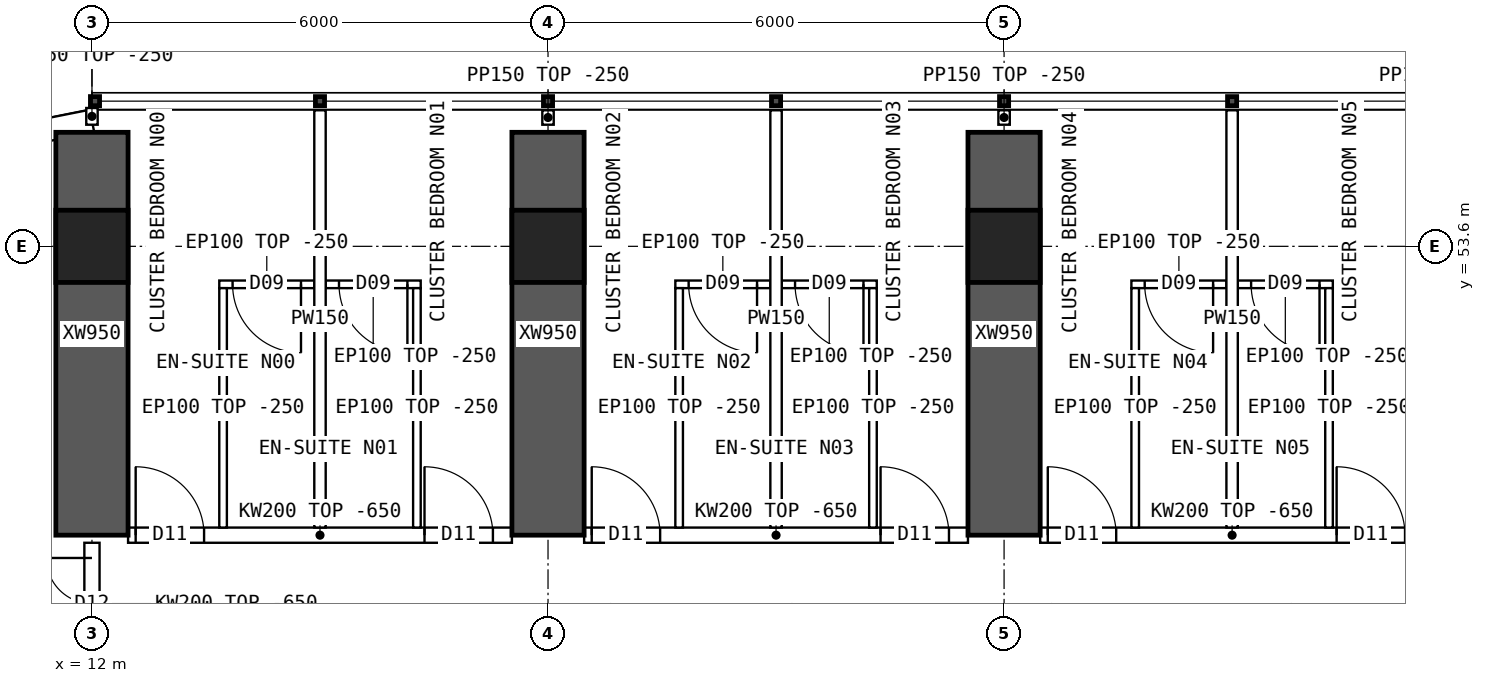
"""IFC4 building model, lengths in metres.
Left out: names, types, materials, properties, quantities, classifications, styles, units other than length and angle.
Written with IfcOpenShell. Run it as: python <this file> out.ifc"""

import sys

from ifc_helpers import new_model, si_unit, direction, frame, frame_2d, origin, origin_2d, place, context, subcontext, project, spatial, polyline, rectangle, hollow_rectangle, outline, extrude, element, fill, save


model = new_model("IFC4")
c1 = context("Model", 3, precision=1e-05, world=origin(), true_north=direction((0.0, 1.0)))
c2 = subcontext(c1, "Body", "Model", "MODEL_VIEW")
j1 = project(units=[si_unit("LENGTHUNIT", "METRE"), si_unit("PLANEANGLEUNIT", "RADIAN")], contexts=[c1])
p1 = place(None, origin())
s1 = spatial("IfcSite", under=j1, at=p1, CompositionType="ELEMENT")
p2 = place(p1, origin())
s2 = spatial("IfcBuilding", under=s1, at=p2, CompositionType="ELEMENT")
p3 = place(p2, frame((0.0, 0.0, 114.4)))
s3 = spatial("IfcBuildingStorey", under=s2, at=p3, CompositionType="ELEMENT", Elevation=114.4)
for number, where, z_axis, x_axis in (
    (1, (12.0, 53.6, 0.0), (0.0, 0.0, 1.0), (1.0, 0.0, 0.0)),
    (2, (18.0, 53.6, 0.0), (0.0, 0.0, 1.0), (1.0, 0.0, 0.0)),
    (3, (24.0, 53.6, 0.0), (0.0, 0.0, 1.0), (1.0, 0.0, 0.0)),
):
    element("IfcColumn", number, at=place(p3, frame(where, z_axis=z_axis, x_axis=x_axis)), inside=s3, PredefinedType="COLUMN", context=c2, shape_type="SweptSolid", body=[
        extrude(hollow_rectangle(XDim=0.95, YDim=0.95, WallThickness=0.095, at=origin_2d()), origin(), (0.0, 0.0, 1.0), 3.75),
    ])
for number, where, z_axis, x_axis in (
    (4, (12.0, 49.8, 0.0), (0.0, 0.0, 1.0), (0.0, 1.0, 0.0)),
    (5, (18.0, 49.8, 0.0), (0.0, 0.0, 1.0), (0.0, 1.0, 0.0)),
    (6, (24.0, 49.8, 0.0), (0.0, 0.0, 1.0), (0.0, 1.0, 0.0)),
):
    element("IfcWall", number, at=place(p3, frame(where, z_axis=z_axis, x_axis=x_axis)), inside=s3, PredefinedType="SHEAR", context=c2, shape_type="SweptSolid", body=[
        extrude(rectangle(XDim=5.3, YDim=0.95, at=frame_2d((2.65, 0.0))), origin(), (0.0, 0.0, 1.0), 3.75),
    ])
p4 = place(p3, frame((12.0, 55.25, 0.0), z_axis=(0.0, 0.0, 1.0), x_axis=(-0.980787251524, -0.195080412259, 0.0)))
e7 = element("IfcWall", 7, at=p4, inside=s3, PredefinedType="SOLIDWALL", context=c2, shape_type="SweptSolid", body=[
    extrude(outline(polyline([(-0.03, -0.15), (3.249, -0.15), (3.189, 0.15), (0.03, 0.15), (-0.03, -0.15)])), origin(), (0.0, 0.0, 1.0), 3.5),
])
p5 = place(p4, frame((0.909, 0.0, 0.9)))
e8 = element("IfcOpeningElement", 8, at=p5, cuts=e7, PredefinedType="OPENING", context=c2, shape_type="SweptSolid", body=[
    extrude(rectangle(XDim=1.4, YDim=1.8, at=frame_2d((0.7, 0.9))), frame((0.0, 0.16, 0.0), z_axis=(0.0, -1.0, 0.0), x_axis=(1.0, 0.0, 0.0)), (0.0, 0.0, 1.0), 0.32),
])
p6 = place(p3, frame((12.475, 49.8, 0.0), z_axis=(0.0, 0.0, 1.0), x_axis=(1.0, 0.0, 0.0)))
e9 = element("IfcWall", 9, at=p6, inside=s3, PredefinedType="SOLIDWALL", context=c2, shape_type="SweptSolid", body=[
    extrude(outline(polyline([(0.0, 0.0), (5.05, 0.0), (5.05, 3.1), (0.0, 3.1), (0.0, 0.0)])), frame((0.0, 0.1, 0.0), z_axis=(0.0, -1.0, 0.0), x_axis=(1.0, 0.0, 0.0)), (0.0, 0.0, 1.0), 0.2),
])
p7 = place(p6, frame((0.1, 0.0, 0.0)))
e10 = element("IfcOpeningElement", 10, at=p7, cuts=e9, PredefinedType="OPENING", context=c2, shape_type="SweptSolid", body=[
    extrude(rectangle(XDim=0.9, YDim=2.1, at=frame_2d((0.45, 1.05))), frame((0.0, 0.11, 0.0), z_axis=(0.0, -1.0, 0.0), x_axis=(1.0, 0.0, 0.0)), (0.0, 0.0, 1.0), 0.22),
])
p8 = place(p6, frame((3.9, 0.0, 0.0)))
e11 = element("IfcOpeningElement", 11, at=p8, cuts=e9, PredefinedType="OPENING", context=c2, shape_type="SweptSolid", body=[
    extrude(rectangle(XDim=0.9, YDim=2.1, at=frame_2d((0.45, 1.05))), frame((0.0, 0.11, 0.0), z_axis=(0.0, -1.0, 0.0), x_axis=(1.0, 0.0, 0.0)), (0.0, 0.0, 1.0), 0.22),
])
p9 = place(p3, frame((18.475, 49.8, 0.0), z_axis=(0.0, 0.0, 1.0), x_axis=(1.0, 0.0, 0.0)))
e12 = element("IfcWall", 12, at=p9, inside=s3, PredefinedType="SOLIDWALL", context=c2, shape_type="SweptSolid", body=[
    extrude(outline(polyline([(0.0, 0.0), (5.05, 0.0), (5.05, 3.1), (0.0, 3.1), (0.0, 0.0)])), frame((0.0, 0.1, 0.0), z_axis=(0.0, -1.0, 0.0), x_axis=(1.0, 0.0, 0.0)), (0.0, 0.0, 1.0), 0.2),
])
p10 = place(p9, frame((0.1, 0.0, 0.0)))
e13 = element("IfcOpeningElement", 13, at=p10, cuts=e12, PredefinedType="OPENING", context=c2, shape_type="SweptSolid", body=[
    extrude(rectangle(XDim=0.9, YDim=2.1, at=frame_2d((0.45, 1.05))), frame((0.0, 0.11, 0.0), z_axis=(0.0, -1.0, 0.0), x_axis=(1.0, 0.0, 0.0)), (0.0, 0.0, 1.0), 0.22),
])
p11 = place(p9, frame((3.9, 0.0, 0.0)))
e14 = element("IfcOpeningElement", 14, at=p11, cuts=e12, PredefinedType="OPENING", context=c2, shape_type="SweptSolid", body=[
    extrude(rectangle(XDim=0.9, YDim=2.1, at=frame_2d((0.45, 1.05))), frame((0.0, 0.11, 0.0), z_axis=(0.0, -1.0, 0.0), x_axis=(1.0, 0.0, 0.0)), (0.0, 0.0, 1.0), 0.22),
])
p12 = place(p3, frame((24.475, 49.8, 0.0), z_axis=(0.0, 0.0, 1.0), x_axis=(1.0, 0.0, 0.0)))
e15 = element("IfcWall", 15, at=p12, inside=s3, PredefinedType="SOLIDWALL", context=c2, shape_type="SweptSolid", body=[
    extrude(outline(polyline([(0.0, 0.0), (5.05, 0.0), (5.05, 3.1), (0.0, 3.1), (0.0, 0.0)])), frame((0.0, 0.1, 0.0), z_axis=(0.0, -1.0, 0.0), x_axis=(1.0, 0.0, 0.0)), (0.0, 0.0, 1.0), 0.2),
])
p13 = place(p12, frame((0.1, 0.0, 0.0)))
e16 = element("IfcOpeningElement", 16, at=p13, cuts=e15, PredefinedType="OPENING", context=c2, shape_type="SweptSolid", body=[
    extrude(rectangle(XDim=0.9, YDim=2.1, at=frame_2d((0.45, 1.05))), frame((0.0, 0.11, 0.0), z_axis=(0.0, -1.0, 0.0), x_axis=(1.0, 0.0, 0.0)), (0.0, 0.0, 1.0), 0.22),
])
p14 = place(p12, frame((3.9, 0.0, 0.0)))
e17 = element("IfcOpeningElement", 17, at=p14, cuts=e15, PredefinedType="OPENING", context=c2, shape_type="SweptSolid", body=[
    extrude(rectangle(XDim=0.9, YDim=2.1, at=frame_2d((0.45, 1.05))), frame((0.0, 0.11, 0.0), z_axis=(0.0, -1.0, 0.0), x_axis=(1.0, 0.0, 0.0)), (0.0, 0.0, 1.0), 0.22),
])
p15 = place(p3, frame((15.0, 55.39, 0.0), z_axis=(0.0, 0.0, 1.0), x_axis=(0.0, -1.0, 0.0)))
e18 = element("IfcWall", 18, at=p15, inside=s3, PredefinedType="PARTITIONING", context=c2, shape_type="SweptSolid", body=[
    extrude(outline(polyline([(0.0, 0.0), (5.49, 0.0), (5.49, 3.1), (5.442, 3.1), (5.44, 3.5), (1.992, 3.5), (1.99, 3.1), (1.592, 3.1), (1.59, 3.5), (0.0, 3.5), (0.0, 0.0)])), frame((0.0, 0.075, 0.0), z_axis=(0.0, -1.0, 0.0), x_axis=(1.0, 0.0, 0.0)), (0.0, 0.0, 1.0), 0.15),
])
p16 = place(p3, frame((13.675, 53.1, 0.0), z_axis=(0.0, 0.0, 1.0), x_axis=(1.0, 0.0, 0.0)))
e19 = element("IfcWall", 19, at=p16, inside=s3, PredefinedType="PARTITIONING", context=c2, shape_type="SweptSolid", body=[
    extrude(rectangle(XDim=1.25, YDim=0.1, at=frame_2d((0.625, 0.0))), origin(), (0.0, 0.0, 1.0), 3.5),
])
p17 = place(p16, frame((0.175, 0.0, 0.0)))
e20 = element("IfcOpeningElement", 20, at=p17, cuts=e19, PredefinedType="OPENING", context=c2, shape_type="SweptSolid", body=[
    extrude(rectangle(XDim=0.9, YDim=2.1, at=frame_2d((0.45, 1.05))), frame((0.0, 0.06, 0.0), z_axis=(0.0, -1.0, 0.0), x_axis=(1.0, 0.0, 0.0)), (0.0, 0.0, 1.0), 0.12),
])
p18 = place(p3, frame((13.725, 53.05, 0.0), z_axis=(0.0, 0.0, 1.0), x_axis=(0.0, -1.0, 0.0)))
e21 = element("IfcWall", 21, at=p18, inside=s3, PredefinedType="PARTITIONING", context=c2, shape_type="SweptSolid", body=[
    extrude(outline(polyline([(0.0, 0.0), (3.15, 0.0), (3.15, 3.1), (3.102, 3.1), (3.1, 3.5), (0.0, 3.5), (0.0, 0.0)])), frame((0.0, 0.05, 0.0), z_axis=(0.0, -1.0, 0.0), x_axis=(1.0, 0.0, 0.0)), (0.0, 0.0, 1.0), 0.1),
])
p19 = place(p3, frame((15.075, 53.1, 0.0), z_axis=(0.0, 0.0, 1.0), x_axis=(1.0, 0.0, 0.0)))
e22 = element("IfcWall", 22, at=p19, inside=s3, PredefinedType="PARTITIONING", context=c2, shape_type="SweptSolid", body=[
    extrude(rectangle(XDim=1.25, YDim=0.1, at=frame_2d((0.625, 0.0))), origin(), (0.0, 0.0, 1.0), 3.5),
])
p20 = place(p19, frame((0.175, 0.0, 0.0)))
e23 = element("IfcOpeningElement", 23, at=p20, cuts=e22, PredefinedType="OPENING", context=c2, shape_type="SweptSolid", body=[
    extrude(rectangle(XDim=0.9, YDim=2.1, at=frame_2d((0.45, 1.05))), frame((0.0, 0.06, 0.0), z_axis=(0.0, -1.0, 0.0), x_axis=(1.0, 0.0, 0.0)), (0.0, 0.0, 1.0), 0.12),
])
p21 = place(p3, frame((16.275, 53.05, 0.0), z_axis=(0.0, 0.0, 1.0), x_axis=(0.0, -1.0, 0.0)))
e24 = element("IfcWall", 24, at=p21, inside=s3, PredefinedType="PARTITIONING", context=c2, shape_type="SweptSolid", body=[
    extrude(outline(polyline([(0.0, 0.0), (3.15, 0.0), (3.15, 3.1), (3.102, 3.1), (3.1, 3.5), (0.0, 3.5), (0.0, 0.0)])), frame((0.0, 0.05, 0.0), z_axis=(0.0, -1.0, 0.0), x_axis=(1.0, 0.0, 0.0)), (0.0, 0.0, 1.0), 0.1),
])
p22 = place(p3, frame((21.0, 55.39, 0.0), z_axis=(0.0, 0.0, 1.0), x_axis=(0.0, -1.0, 0.0)))
e25 = element("IfcWall", 25, at=p22, inside=s3, PredefinedType="PARTITIONING", context=c2, shape_type="SweptSolid", body=[
    extrude(outline(polyline([(0.0, 0.0), (5.49, 0.0), (5.49, 3.1), (5.442, 3.1), (5.44, 3.5), (1.992, 3.5), (1.99, 3.1), (1.592, 3.1), (1.59, 3.5), (0.0, 3.5), (0.0, 0.0)])), frame((0.0, 0.075, 0.0), z_axis=(0.0, -1.0, 0.0), x_axis=(1.0, 0.0, 0.0)), (0.0, 0.0, 1.0), 0.15),
])
p23 = place(p3, frame((19.675, 53.1, 0.0), z_axis=(0.0, 0.0, 1.0), x_axis=(1.0, 0.0, 0.0)))
e26 = element("IfcWall", 26, at=p23, inside=s3, PredefinedType="PARTITIONING", context=c2, shape_type="SweptSolid", body=[
    extrude(rectangle(XDim=1.25, YDim=0.1, at=frame_2d((0.625, 0.0))), origin(), (0.0, 0.0, 1.0), 3.5),
])
p24 = place(p23, frame((0.175, 0.0, 0.0)))
e27 = element("IfcOpeningElement", 27, at=p24, cuts=e26, PredefinedType="OPENING", context=c2, shape_type="SweptSolid", body=[
    extrude(rectangle(XDim=0.9, YDim=2.1, at=frame_2d((0.45, 1.05))), frame((0.0, 0.06, 0.0), z_axis=(0.0, -1.0, 0.0), x_axis=(1.0, 0.0, 0.0)), (0.0, 0.0, 1.0), 0.12),
])
p25 = place(p3, frame((19.725, 53.05, 0.0), z_axis=(0.0, 0.0, 1.0), x_axis=(0.0, -1.0, 0.0)))
e28 = element("IfcWall", 28, at=p25, inside=s3, PredefinedType="PARTITIONING", context=c2, shape_type="SweptSolid", body=[
    extrude(outline(polyline([(0.0, 0.0), (3.15, 0.0), (3.15, 3.1), (3.102, 3.1), (3.1, 3.5), (0.0, 3.5), (0.0, 0.0)])), frame((0.0, 0.05, 0.0), z_axis=(0.0, -1.0, 0.0), x_axis=(1.0, 0.0, 0.0)), (0.0, 0.0, 1.0), 0.1),
])
p26 = place(p3, frame((21.075, 53.1, 0.0), z_axis=(0.0, 0.0, 1.0), x_axis=(1.0, 0.0, 0.0)))
e29 = element("IfcWall", 29, at=p26, inside=s3, PredefinedType="PARTITIONING", context=c2, shape_type="SweptSolid", body=[
    extrude(rectangle(XDim=1.25, YDim=0.1, at=frame_2d((0.625, 0.0))), origin(), (0.0, 0.0, 1.0), 3.5),
])
p27 = place(p26, frame((0.175, 0.0, 0.0)))
e30 = element("IfcOpeningElement", 30, at=p27, cuts=e29, PredefinedType="OPENING", context=c2, shape_type="SweptSolid", body=[
    extrude(rectangle(XDim=0.9, YDim=2.1, at=frame_2d((0.45, 1.05))), frame((0.0, 0.06, 0.0), z_axis=(0.0, -1.0, 0.0), x_axis=(1.0, 0.0, 0.0)), (0.0, 0.0, 1.0), 0.12),
])
p28 = place(p3, frame((22.275, 53.05, 0.0), z_axis=(0.0, 0.0, 1.0), x_axis=(0.0, -1.0, 0.0)))
e31 = element("IfcWall", 31, at=p28, inside=s3, PredefinedType="PARTITIONING", context=c2, shape_type="SweptSolid", body=[
    extrude(outline(polyline([(0.0, 0.0), (3.15, 0.0), (3.15, 3.1), (3.102, 3.1), (3.1, 3.5), (0.0, 3.5), (0.0, 0.0)])), frame((0.0, 0.05, 0.0), z_axis=(0.0, -1.0, 0.0), x_axis=(1.0, 0.0, 0.0)), (0.0, 0.0, 1.0), 0.1),
])
p29 = place(p3, frame((27.0, 55.39, 0.0), z_axis=(0.0, 0.0, 1.0), x_axis=(0.0, -1.0, 0.0)))
e32 = element("IfcWall", 32, at=p29, inside=s3, PredefinedType="PARTITIONING", context=c2, shape_type="SweptSolid", body=[
    extrude(outline(polyline([(0.0, 0.0), (5.49, 0.0), (5.49, 3.1), (5.442, 3.1), (5.44, 3.5), (1.992, 3.5), (1.99, 3.1), (1.592, 3.1), (1.59, 3.5), (0.0, 3.5), (0.0, 0.0)])), frame((0.0, 0.075, 0.0), z_axis=(0.0, -1.0, 0.0), x_axis=(1.0, 0.0, 0.0)), (0.0, 0.0, 1.0), 0.15),
])
p30 = place(p3, frame((25.675, 53.1, 0.0), z_axis=(0.0, 0.0, 1.0), x_axis=(1.0, 0.0, 0.0)))
e33 = element("IfcWall", 33, at=p30, inside=s3, PredefinedType="PARTITIONING", context=c2, shape_type="SweptSolid", body=[
    extrude(rectangle(XDim=1.25, YDim=0.1, at=frame_2d((0.625, 0.0))), origin(), (0.0, 0.0, 1.0), 3.5),
])
p31 = place(p30, frame((0.175, 0.0, 0.0)))
e34 = element("IfcOpeningElement", 34, at=p31, cuts=e33, PredefinedType="OPENING", context=c2, shape_type="SweptSolid", body=[
    extrude(rectangle(XDim=0.9, YDim=2.1, at=frame_2d((0.45, 1.05))), frame((0.0, 0.06, 0.0), z_axis=(0.0, -1.0, 0.0), x_axis=(1.0, 0.0, 0.0)), (0.0, 0.0, 1.0), 0.12),
])
p32 = place(p3, frame((25.725, 53.05, 0.0), z_axis=(0.0, 0.0, 1.0), x_axis=(0.0, -1.0, 0.0)))
e35 = element("IfcWall", 35, at=p32, inside=s3, PredefinedType="PARTITIONING", context=c2, shape_type="SweptSolid", body=[
    extrude(outline(polyline([(0.0, 0.0), (3.15, 0.0), (3.15, 3.1), (3.102, 3.1), (3.1, 3.5), (0.0, 3.5), (0.0, 0.0)])), frame((0.0, 0.05, 0.0), z_axis=(0.0, -1.0, 0.0), x_axis=(1.0, 0.0, 0.0)), (0.0, 0.0, 1.0), 0.1),
])
p33 = place(p3, frame((27.075, 53.1, 0.0), z_axis=(0.0, 0.0, 1.0), x_axis=(1.0, 0.0, 0.0)))
e36 = element("IfcWall", 36, at=p33, inside=s3, PredefinedType="PARTITIONING", context=c2, shape_type="SweptSolid", body=[
    extrude(rectangle(XDim=1.25, YDim=0.1, at=frame_2d((0.625, 0.0))), origin(), (0.0, 0.0, 1.0), 3.5),
])
p34 = place(p33, frame((0.175, 0.0, 0.0)))
e37 = element("IfcOpeningElement", 37, at=p34, cuts=e36, PredefinedType="OPENING", context=c2, shape_type="SweptSolid", body=[
    extrude(rectangle(XDim=0.9, YDim=2.1, at=frame_2d((0.45, 1.05))), frame((0.0, 0.06, 0.0), z_axis=(0.0, -1.0, 0.0), x_axis=(1.0, 0.0, 0.0)), (0.0, 0.0, 1.0), 0.12),
])
p35 = place(p3, frame((28.275, 53.05, 0.0), z_axis=(0.0, 0.0, 1.0), x_axis=(0.0, -1.0, 0.0)))
e38 = element("IfcWall", 38, at=p35, inside=s3, PredefinedType="PARTITIONING", context=c2, shape_type="SweptSolid", body=[
    extrude(outline(polyline([(0.0, 0.0), (3.15, 0.0), (3.15, 3.1), (3.102, 3.1), (3.1, 3.5), (0.0, 3.5), (0.0, 0.0)])), frame((0.0, 0.05, 0.0), z_axis=(0.0, -1.0, 0.0), x_axis=(1.0, 0.0, 0.0)), (0.0, 0.0, 1.0), 0.1),
])
p36 = place(p3, frame((12.0, 48.1, 0.0), z_axis=(0.0, 0.0, 1.0), x_axis=(0.0, 1.0, 0.0)))
e39 = element("IfcWall", 39, at=p36, inside=s3, PredefinedType="SOLIDWALL", context=c2, shape_type="SweptSolid", body=[
    extrude(outline(polyline([(0.0, 0.0), (1.6, 0.0), (1.6, 3.1), (0.0, 3.1), (0.0, 0.0)])), frame((0.0, 0.1, 0.0), z_axis=(0.0, -1.0, 0.0), x_axis=(1.0, 0.0, 0.0)), (0.0, 0.0, 1.0), 0.2),
])
p37 = place(p36, frame((0.2, 0.0, 0.0)))
e40 = element("IfcOpeningElement", 40, at=p37, cuts=e39, PredefinedType="OPENING", context=c2, shape_type="SweptSolid", body=[
    extrude(rectangle(XDim=1.2, YDim=2.1, at=frame_2d((0.6, 1.05))), frame((0.0, 0.11, 0.0), z_axis=(0.0, -1.0, 0.0), x_axis=(1.0, 0.0, 0.0)), (0.0, 0.0, 1.0), 0.22),
])
p38 = place(p3, frame((12.0, 55.2, 0.0), z_axis=(0.0, 0.0, 1.0), x_axis=(0.0, 1.0, 0.0)))
e41 = element("IfcWall", 41, at=p38, inside=s3, PredefinedType="PARTITIONING", context=c2, shape_type="SweptSolid", body=[
    extrude(rectangle(XDim=0.22, YDim=0.15, at=frame_2d((0.11, 0.0))), origin(), (0.0, 0.0, 1.0), 3.5),
])
for number, where, z_axis, x_axis in (
    (42, (18.0, 55.2, 0.0), (0.0, 0.0, 1.0), (0.0, 1.0, 0.0)),
    (43, (24.0, 55.2, 0.0), (0.0, 0.0, 1.0), (0.0, 1.0, 0.0)),
):
    element("IfcWall", number, at=place(p3, frame(where, z_axis=z_axis, x_axis=x_axis)), inside=s3, PredefinedType="PARTITIONING", context=c2, shape_type="SweptSolid", body=[
        extrude(rectangle(XDim=0.19, YDim=0.15, at=frame_2d((0.095, 0.0))), origin(), (0.0, 0.0, 1.0), 3.5),
    ])
p39 = place(p17, origin())
e44 = element("IfcDoor", 44, at=p39, inside=s3, OperationType="SINGLE_SWING_RIGHT", PredefinedType="DOOR", context=c2, shape_type="SweptSolid", body=[
    extrude(rectangle(XDim=0.9, YDim=2.1, at=frame_2d((0.45, 1.05))), frame((0.0, 0.025, 0.0), z_axis=(0.0, -1.0, 0.0), x_axis=(1.0, 0.0, 0.0)), (0.0, 0.0, 1.0), 0.05),
])
fill(e20, e44)
p40 = place(p7, origin())
e45 = element("IfcDoor", 45, at=p40, inside=s3, OperationType="SINGLE_SWING_LEFT", PredefinedType="DOOR", context=c2, shape_type="SweptSolid", body=[
    extrude(rectangle(XDim=0.9, YDim=2.1, at=frame_2d((0.45, 1.05))), frame((0.0, 0.025, 0.0), z_axis=(0.0, -1.0, 0.0), x_axis=(1.0, 0.0, 0.0)), (0.0, 0.0, 1.0), 0.05),
])
fill(e10, e45)
p41 = place(p20, origin())
e46 = element("IfcDoor", 46, at=p41, inside=s3, OperationType="SINGLE_SWING_RIGHT", PredefinedType="DOOR", context=c2, shape_type="SweptSolid", body=[
    extrude(rectangle(XDim=0.9, YDim=2.1, at=frame_2d((0.45, 1.05))), frame((0.0, 0.025, 0.0), z_axis=(0.0, -1.0, 0.0), x_axis=(1.0, 0.0, 0.0)), (0.0, 0.0, 1.0), 0.05),
])
fill(e23, e46)
p42 = place(p8, origin())
e47 = element("IfcDoor", 47, at=p42, inside=s3, OperationType="SINGLE_SWING_LEFT", PredefinedType="DOOR", context=c2, shape_type="SweptSolid", body=[
    extrude(rectangle(XDim=0.9, YDim=2.1, at=frame_2d((0.45, 1.05))), frame((0.0, 0.025, 0.0), z_axis=(0.0, -1.0, 0.0), x_axis=(1.0, 0.0, 0.0)), (0.0, 0.0, 1.0), 0.05),
])
fill(e11, e47)
p43 = place(p24, origin())
e48 = element("IfcDoor", 48, at=p43, inside=s3, OperationType="SINGLE_SWING_RIGHT", PredefinedType="DOOR", context=c2, shape_type="SweptSolid", body=[
    extrude(rectangle(XDim=0.9, YDim=2.1, at=frame_2d((0.45, 1.05))), frame((0.0, 0.025, 0.0), z_axis=(0.0, -1.0, 0.0), x_axis=(1.0, 0.0, 0.0)), (0.0, 0.0, 1.0), 0.05),
])
fill(e27, e48)
p44 = place(p10, origin())
e49 = element("IfcDoor", 49, at=p44, inside=s3, OperationType="SINGLE_SWING_LEFT", PredefinedType="DOOR", context=c2, shape_type="SweptSolid", body=[
    extrude(rectangle(XDim=0.9, YDim=2.1, at=frame_2d((0.45, 1.05))), frame((0.0, 0.025, 0.0), z_axis=(0.0, -1.0, 0.0), x_axis=(1.0, 0.0, 0.0)), (0.0, 0.0, 1.0), 0.05),
])
fill(e13, e49)
p45 = place(p27, origin())
e50 = element("IfcDoor", 50, at=p45, inside=s3, OperationType="SINGLE_SWING_RIGHT", PredefinedType="DOOR", context=c2, shape_type="SweptSolid", body=[
    extrude(rectangle(XDim=0.9, YDim=2.1, at=frame_2d((0.45, 1.05))), frame((0.0, 0.025, 0.0), z_axis=(0.0, -1.0, 0.0), x_axis=(1.0, 0.0, 0.0)), (0.0, 0.0, 1.0), 0.05),
])
fill(e30, e50)
p46 = place(p11, origin())
e51 = element("IfcDoor", 51, at=p46, inside=s3, OperationType="SINGLE_SWING_LEFT", PredefinedType="DOOR", context=c2, shape_type="SweptSolid", body=[
    extrude(rectangle(XDim=0.9, YDim=2.1, at=frame_2d((0.45, 1.05))), frame((0.0, 0.025, 0.0), z_axis=(0.0, -1.0, 0.0), x_axis=(1.0, 0.0, 0.0)), (0.0, 0.0, 1.0), 0.05),
])
fill(e14, e51)
p47 = place(p31, origin())
e52 = element("IfcDoor", 52, at=p47, inside=s3, OperationType="SINGLE_SWING_RIGHT", PredefinedType="DOOR", context=c2, shape_type="SweptSolid", body=[
    extrude(rectangle(XDim=0.9, YDim=2.1, at=frame_2d((0.45, 1.05))), frame((0.0, 0.025, 0.0), z_axis=(0.0, -1.0, 0.0), x_axis=(1.0, 0.0, 0.0)), (0.0, 0.0, 1.0), 0.05),
])
fill(e34, e52)
p48 = place(p13, origin())
e53 = element("IfcDoor", 53, at=p48, inside=s3, OperationType="SINGLE_SWING_LEFT", PredefinedType="DOOR", context=c2, shape_type="SweptSolid", body=[
    extrude(rectangle(XDim=0.9, YDim=2.1, at=frame_2d((0.45, 1.05))), frame((0.0, 0.025, 0.0), z_axis=(0.0, -1.0, 0.0), x_axis=(1.0, 0.0, 0.0)), (0.0, 0.0, 1.0), 0.05),
])
fill(e16, e53)
p49 = place(p34, origin())
e54 = element("IfcDoor", 54, at=p49, inside=s3, OperationType="SINGLE_SWING_RIGHT", PredefinedType="DOOR", context=c2, shape_type="SweptSolid", body=[
    extrude(rectangle(XDim=0.9, YDim=2.1, at=frame_2d((0.45, 1.05))), frame((0.0, 0.025, 0.0), z_axis=(0.0, -1.0, 0.0), x_axis=(1.0, 0.0, 0.0)), (0.0, 0.0, 1.0), 0.05),
])
fill(e37, e54)
p50 = place(p14, origin())
e55 = element("IfcDoor", 55, at=p50, inside=s3, OperationType="SINGLE_SWING_LEFT", PredefinedType="DOOR", context=c2, shape_type="SweptSolid", body=[
    extrude(rectangle(XDim=0.9, YDim=2.1, at=frame_2d((0.45, 1.05))), frame((0.0, 0.025, 0.0), z_axis=(0.0, -1.0, 0.0), x_axis=(1.0, 0.0, 0.0)), (0.0, 0.0, 1.0), 0.05),
])
fill(e17, e55)
p51 = place(p37, origin())
e56 = element("IfcDoor", 56, at=p51, inside=s3, OperationType="DOUBLE_DOOR_SINGLE_SWING", PredefinedType="DOOR", context=c2, shape_type="SweptSolid", body=[
    extrude(rectangle(XDim=1.2, YDim=2.1, at=frame_2d((0.6, 1.05))), frame((0.0, 0.025, 0.0), z_axis=(0.0, -1.0, 0.0), x_axis=(1.0, 0.0, 0.0)), (0.0, 0.0, 1.0), 0.05),
])
fill(e40, e56)
save(model, sys.argv[1])
